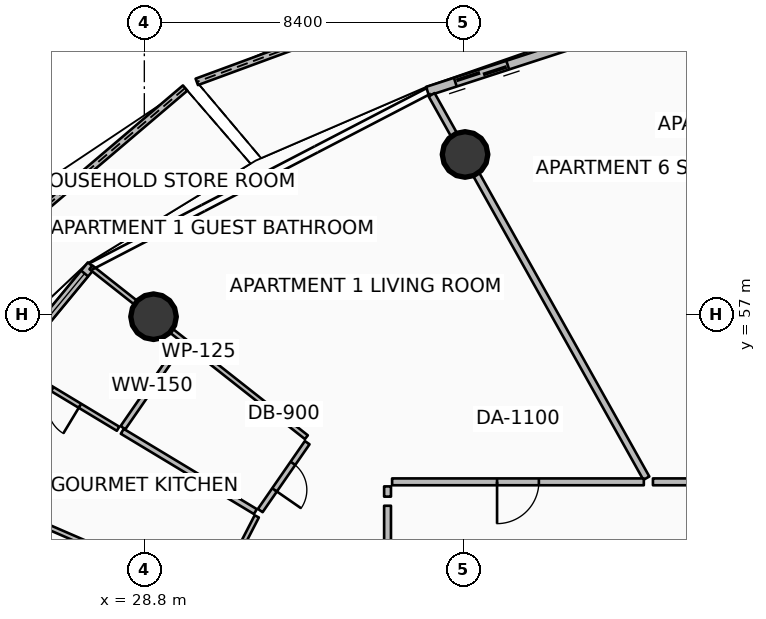
"""IFC4 building model, lengths in metres.
Left out: names, types, materials, properties, quantities, classifications, styles, units other than length and angle.
Written with IfcOpenShell. Run it as: python <this file> out.ifc"""

import sys

from ifc_helpers import new_model, si_unit, direction, frame, frame_2d, origin, origin_2d, place, context, subcontext, project, spatial, polyline, rectangle, circle, outline, extrude, element, fill, save


model = new_model("IFC4")
c1 = context("Model", 3, precision=1e-05, world=origin(), true_north=direction((0.0, 1.0)))
c2 = subcontext(c1, "Body", "Model", "MODEL_VIEW")
j1 = project(units=[si_unit("LENGTHUNIT", "METRE"), si_unit("PLANEANGLEUNIT", "RADIAN")], contexts=[c1])
p1 = place(None, origin())
s1 = spatial("IfcSite", under=j1, at=p1, CompositionType="ELEMENT")
p2 = place(p1, origin())
s2 = spatial("IfcBuilding", under=s1, at=p2, CompositionType="ELEMENT")
p3 = place(p2, frame((0.0, 0.0, 82.65)))
s3 = spatial("IfcBuildingStorey", under=s2, at=p3, CompositionType="ELEMENT", Elevation=82.65)
for number, where, z_axis, x_axis in (
    (1, (37.24, 61.214, 0.0), (0.0, 0.0, 1.0), (1.0, 0.0, 0.0)),
    (2, (29.042, 56.945, 0.0), (0.0, 0.0, 1.0), (1.0, 0.0, 0.0)),
):
    element("IfcColumn", number, at=place(p3, frame(where, z_axis=z_axis, x_axis=x_axis)), inside=s3, PredefinedType="COLUMN", context=c2, shape_type="SweptSolid", body=[
        extrude(circle(Radius=0.6, at=origin_2d()), origin(), (0.0, 0.0, 1.0), 3.5),
    ])
p4 = place(p3, frame((39.853, 66.687, 0.0), z_axis=(0.0, 0.0, 1.0), x_axis=(-0.938356460989, -0.345669136777, 0.0)))
e3 = element("IfcWall", 3, at=p4, inside=s3, PredefinedType="PARAPET", context=c2, shape_type="SweptSolid", body=[
    extrude(outline(polyline([(0.0, 0.0), (10.308, 0.0), (10.308, 1.86), (5.154, 1.798), (0.0, 1.632), (0.0, 0.0)])), frame((0.0, 0.09, 0.0), z_axis=(0.0, -1.0, 0.0), x_axis=(1.0, 0.0, 0.0)), (0.0, 0.0, 1.0), 0.18),
])
p5 = place(p3, frame((29.874, 62.962, 0.0), z_axis=(0.0, 0.0, 1.0), x_axis=(-0.761849488871, -0.647754086291, 0.0)))
e4 = element("IfcWall", 4, at=p5, inside=s3, PredefinedType="PARAPET", context=c2, shape_type="SweptSolid", body=[
    extrude(outline(polyline([(0.0, 0.0), (11.2, 0.0), (11.2, 1.632), (5.6, 1.798), (0.0, 1.86), (0.0, 0.0)])), frame((0.0, 0.09, 0.0), z_axis=(0.0, -1.0, 0.0), x_axis=(1.0, 0.0, 0.0)), (0.0, 0.0, 1.0), 0.18),
])
p6 = place(p3, frame((45.233, 65.797, 0.0), z_axis=(0.0, 0.0, 1.0), x_axis=(-0.951052494852, -0.30902937083, 0.0)))
e5 = element("IfcWall", 5, at=p6, inside=s3, PredefinedType="SOLIDWALL", context=c2, shape_type="SweptSolid", body=[
    extrude(rectangle(XDim=9.444, YDim=0.24, at=frame_2d((4.722, 0.0))), origin(), (0.0, 0.0, 1.0), 2.45),
])
p7 = place(p6, frame((7.224, 0.0, 0.0)))
e6 = element("IfcOpeningElement", 6, at=p7, cuts=e5, PredefinedType="OPENING", context=c2, shape_type="SweptSolid", body=[
    extrude(rectangle(XDim=1.45, YDim=2.15, at=frame_2d((0.725, 1.075))), frame((0.0, 0.13, 0.0), z_axis=(0.0, -1.0, 0.0), x_axis=(1.0, 0.0, 0.0)), (0.0, 0.0, 1.0), 0.26),
])
p8 = place(p6, frame((0.28, 0.0, 0.65)))
e7 = element("IfcOpeningElement", 7, at=p8, cuts=e5, PredefinedType="OPENING", context=c2, shape_type="SweptSolid", body=[
    extrude(rectangle(XDim=1.6, YDim=1.5, at=frame_2d((0.8, 0.75))), frame((0.0, 0.13, 0.0), z_axis=(0.0, -1.0, 0.0), x_axis=(1.0, 0.0, 0.0)), (0.0, 0.0, 1.0), 0.26),
])
p9 = place(p3, frame((27.407, 58.298, 0.0), z_axis=(0.0, 0.0, 1.0), x_axis=(-0.636704975, -0.771107498868, 0.0)))
e8 = element("IfcWall", 8, at=p9, inside=s3, PredefinedType="SOLIDWALL", context=c2, shape_type="SweptSolid", body=[
    extrude(rectangle(XDim=11.084, YDim=0.24, at=frame_2d((5.542, 0.0))), origin(), (0.0, 0.0, 1.0), 2.45),
])
p10 = place(p9, frame((8.864, 0.0, 0.0)))
e9 = element("IfcOpeningElement", 9, at=p10, cuts=e8, PredefinedType="OPENING", context=c2, shape_type="SweptSolid", body=[
    extrude(rectangle(XDim=1.45, YDim=2.15, at=frame_2d((0.725, 1.075))), frame((0.0, 0.13, 0.0), z_axis=(0.0, -1.0, 0.0), x_axis=(1.0, 0.0, 0.0)), (0.0, 0.0, 1.0), 0.26),
])
p11 = place(p9, frame((0.28, 0.0, 0.65)))
e10 = element("IfcOpeningElement", 10, at=p11, cuts=e8, PredefinedType="OPENING", context=c2, shape_type="SweptSolid", body=[
    extrude(rectangle(XDim=1.6, YDim=1.5, at=frame_2d((0.8, 0.75))), frame((0.0, 0.13, 0.0), z_axis=(0.0, -1.0, 0.0), x_axis=(1.0, 0.0, 0.0)), (0.0, 0.0, 1.0), 0.26),
])
p12 = place(p3, frame((42.01, 52.696, 0.0), z_axis=(0.0, 0.0, 1.0), x_axis=(-0.488628442553, 0.872491974249, 0.0)))
e11 = element("IfcWall", 11, at=p12, inside=s3, PredefinedType="PARTITIONING", context=c2, shape_type="SweptSolid", body=[
    extrude(rectangle(XDim=11.563, YDim=0.18, at=frame_2d((5.782, 0.0))), origin(), (0.0, 0.0, 1.0), 2.94),
])
p13 = place(p3, frame((41.944, 52.6, 0.0), z_axis=(0.0, 0.0, 1.0), x_axis=(-1.0, 0.0, 0.0)))
e12 = element("IfcWall", 12, at=p13, inside=s3, PredefinedType="PARTITIONING", context=c2, shape_type="SweptSolid", body=[
    extrude(rectangle(XDim=6.624, YDim=0.18, at=frame_2d((3.312, 0.0))), origin(), (0.0, 0.0, 1.0), 2.94),
])
p14 = place(p13, frame((2.762, 0.0, 0.0)))
e13 = element("IfcOpeningElement", 13, at=p14, cuts=e12, PredefinedType="OPENING", context=c2, shape_type="SweptSolid", body=[
    extrude(rectangle(XDim=1.1, YDim=2.1, at=frame_2d((0.55, 1.05))), frame((0.0, 0.1, 0.0), z_axis=(0.0, -1.0, 0.0), x_axis=(1.0, 0.0, 0.0)), (0.0, 0.0, 1.0), 0.2),
])
p15 = place(p3, frame((35.2, 52.48, 0.0), z_axis=(0.0, 0.0, 1.0), x_axis=(0.0, -1.0, 0.0)))
e14 = element("IfcWall", 14, at=p15, inside=s3, PredefinedType="PARTITIONING", context=c2, shape_type="SweptSolid", body=[
    extrude(rectangle(XDim=0.269, YDim=0.18, at=frame_2d((0.135, 0.0))), origin(), (0.0, 0.0, 1.0), 2.94),
])
p16 = place(p3, frame((35.2, 51.971, 0.0), z_axis=(0.0, 0.0, 1.0), x_axis=(0.0, -1.0, 0.0)))
e15 = element("IfcWall", 15, at=p16, inside=s3, PredefinedType="PARTITIONING", context=c2, shape_type="SweptSolid", body=[
    extrude(rectangle(XDim=6.241, YDim=0.18, at=frame_2d((3.12, 0.0))), origin(), (0.0, 0.0, 1.0), 2.94),
])
p17 = place(p3, frame((33.064, 53.774, 0.0), z_axis=(0.0, 0.0, 1.0), x_axis=(-0.785299836557, 0.61911563274, 0.0)))
e16 = element("IfcWall", 16, at=p17, inside=s3, PredefinedType="PARTITIONING", context=c2, shape_type="SweptSolid", body=[
    extrude(rectangle(XDim=7.219, YDim=0.125, at=frame_2d((3.61, 0.0))), origin(), (0.0, 0.0, 1.0), 2.94),
])
p18 = place(p3, frame((33.086, 53.63, 0.0), z_axis=(0.0, 0.0, 1.0), x_axis=(-0.568917555875, -0.822394561398, 0.0)))
e17 = element("IfcWall", 17, at=p18, inside=s3, PredefinedType="PARTITIONING", context=c2, shape_type="SweptSolid", body=[
    extrude(rectangle(XDim=2.171, YDim=0.15, at=frame_2d((1.085, 0.0))), origin(), (0.0, 0.0, 1.0), 2.94),
])
p19 = place(p18, frame((0.66, 0.0, 0.0)))
e18 = element("IfcOpeningElement", 18, at=p19, cuts=e17, PredefinedType="OPENING", context=c2, shape_type="SweptSolid", body=[
    extrude(rectangle(XDim=0.85, YDim=2.06, at=frame_2d((0.425, 1.03))), frame((0.0, 0.085, 0.0), z_axis=(0.0, -1.0, 0.0), x_axis=(1.0, 0.0, 0.0)), (0.0, 0.0, 1.0), 0.17),
])
p20 = place(p3, frame((29.772, 56.243, 0.0), z_axis=(0.0, 0.0, 1.0), x_axis=(-0.568904038121, -0.822403912569, 0.0)))
e19 = element("IfcWall", 19, at=p20, inside=s3, PredefinedType="PARTITIONING", context=c2, shape_type="SweptSolid", body=[
    extrude(rectangle(XDim=2.698, YDim=0.15, at=frame_2d((1.349, 0.0))), origin(), (0.0, 0.0, 1.0), 2.94),
])
p21 = place(p3, frame((31.722, 51.817, 0.0), z_axis=(0.0, 0.0, 1.0), x_axis=(-0.856305556185, 0.516469548422, 0.0)))
e20 = element("IfcWall", 20, at=p21, inside=s3, PredefinedType="PARTITIONING", context=c2, shape_type="SweptSolid", body=[
    extrude(rectangle(XDim=4.09, YDim=0.15, at=frame_2d((2.045, 0.0))), origin(), (0.0, 0.0, 1.0), 2.94),
])
p22 = place(p3, frame((28.109, 53.997, 0.0), z_axis=(0.0, 0.0, 1.0), x_axis=(-0.856309036054, 0.516463778761, 0.0)))
e21 = element("IfcWall", 21, at=p22, inside=s3, PredefinedType="PARTITIONING", context=c2, shape_type="SweptSolid", body=[
    extrude(rectangle(XDim=3.19, YDim=0.125, at=frame_2d((1.595, 0.0))), origin(), (0.0, 0.0, 1.0), 2.94),
])
p23 = place(p22, frame((1.17, 0.0, 0.0)))
e22 = element("IfcOpeningElement", 22, at=p23, cuts=e21, PredefinedType="OPENING", context=c2, shape_type="SweptSolid", body=[
    extrude(rectangle(XDim=0.85, YDim=2.06, at=frame_2d((0.425, 1.03))), frame((0.0, 0.073, 0.0), z_axis=(0.0, -1.0, 0.0), x_axis=(1.0, 0.0, 0.0)), (0.0, 0.0, 1.0), 0.145),
])
p24 = place(p3, frame((30.557, 49.556, 0.0), z_axis=(0.0, 0.0, 1.0), x_axis=(-0.917609944695, 0.39748206173, 0.0)))
e23 = element("IfcWall", 23, at=p24, inside=s3, PredefinedType="PARTITIONING", context=c2, shape_type="SweptSolid", body=[
    extrude(rectangle(XDim=8.197, YDim=0.125, at=frame_2d((4.099, 0.0))), origin(), (0.0, 0.0, 1.0), 2.94),
])
p25 = place(p3, frame((31.758, 51.691, 0.0), z_axis=(0.0, 0.0, 1.0), x_axis=(-0.458055610994, -0.888923538465, 0.0)))
e24 = element("IfcWall", 24, at=p25, inside=s3, PredefinedType="PARTITIONING", context=c2, shape_type="SweptSolid", body=[
    extrude(rectangle(XDim=2.362, YDim=0.125, at=frame_2d((1.181, 0.0))), origin(), (0.0, 0.0, 1.0), 2.94),
])
p26 = place(p25, frame((0.756, 0.0, 0.0)))
e25 = element("IfcOpeningElement", 25, at=p26, cuts=e24, PredefinedType="OPENING", context=c2, shape_type="SweptSolid", body=[
    extrude(rectangle(XDim=0.85, YDim=2.06, at=frame_2d((0.425, 1.03))), frame((0.0, 0.073, 0.0), z_axis=(0.0, -1.0, 0.0), x_axis=(1.0, 0.0, 0.0)), (0.0, 0.0, 1.0), 0.145),
])
p27 = place(p3, frame((46.625, 52.6, 0.0), z_axis=(0.0, 0.0, 1.0), x_axis=(-1.0, 0.0, 0.0)))
e26 = element("IfcWall", 26, at=p27, inside=s3, PredefinedType="PARTITIONING", context=c2, shape_type="SweptSolid", body=[
    extrude(rectangle(XDim=4.442, YDim=0.18, at=frame_2d((2.221, 0.0))), origin(), (0.0, 0.0, 1.0), 2.94),
])
p28 = place(p27, frame((1.671, 0.0, 0.0)))
e27 = element("IfcOpeningElement", 27, at=p28, cuts=e26, PredefinedType="OPENING", context=c2, shape_type="SweptSolid", body=[
    extrude(rectangle(XDim=1.1, YDim=2.1, at=frame_2d((0.55, 1.05))), frame((0.0, 0.1, 0.0), z_axis=(0.0, -1.0, 0.0), x_axis=(1.0, 0.0, 0.0)), (0.0, 0.0, 1.0), 0.2),
])
p29 = place(p7, origin())
e28 = element("IfcDoor", 28, at=p29, inside=s3, OperationType="DOUBLE_DOOR_SLIDING", PredefinedType="DOOR", context=c2, shape_type="SweptSolid", body=[
    extrude(rectangle(XDim=1.45, YDim=2.15, at=frame_2d((0.725, 1.075))), frame((0.0, 0.025, 0.0), z_axis=(0.0, -1.0, 0.0), x_axis=(1.0, 0.0, 0.0)), (0.0, 0.0, 1.0), 0.05),
])
fill(e6, e28)
p30 = place(p11, origin())
e29 = element("IfcWindow", 29, at=p30, inside=s3, PartitioningType="SINGLE_PANEL", PredefinedType="WINDOW", context=c2, shape_type="SweptSolid", body=[
    extrude(rectangle(XDim=1.6, YDim=1.5, at=frame_2d((0.8, 0.75))), frame((0.0, 0.03, 0.0), z_axis=(0.0, -1.0, 0.0), x_axis=(1.0, 0.0, 0.0)), (0.0, 0.0, 1.0), 0.06),
])
fill(e10, e29)
p31 = place(p14, origin())
e30 = element("IfcDoor", 30, at=p31, inside=s3, OperationType="SINGLE_SWING_RIGHT", PredefinedType="DOOR", context=c2, shape_type="SweptSolid", body=[
    extrude(rectangle(XDim=1.1, YDim=2.1, at=frame_2d((0.55, 1.05))), frame((0.0, 0.025, 0.0), z_axis=(0.0, -1.0, 0.0), x_axis=(1.0, 0.0, 0.0)), (0.0, 0.0, 1.0), 0.05),
])
fill(e13, e30)
p32 = place(p19, origin())
e31 = element("IfcDoor", 31, at=p32, inside=s3, OperationType="SINGLE_SWING_RIGHT", PredefinedType="DOOR", context=c2, shape_type="SweptSolid", body=[
    extrude(rectangle(XDim=0.85, YDim=2.06, at=frame_2d((0.425, 1.03))), frame((0.0, 0.025, 0.0), z_axis=(0.0, -1.0, 0.0), x_axis=(1.0, 0.0, 0.0)), (0.0, 0.0, 1.0), 0.05),
])
fill(e18, e31)
p33 = place(p23, origin())
e32 = element("IfcDoor", 32, at=p33, inside=s3, OperationType="SINGLE_SWING_LEFT", PredefinedType="DOOR", context=c2, shape_type="SweptSolid", body=[
    extrude(rectangle(XDim=0.85, YDim=2.06, at=frame_2d((0.425, 1.03))), frame((0.0, 0.025, 0.0), z_axis=(0.0, -1.0, 0.0), x_axis=(1.0, 0.0, 0.0)), (0.0, 0.0, 1.0), 0.05),
])
fill(e22, e32)
save(model, sys.argv[1])
